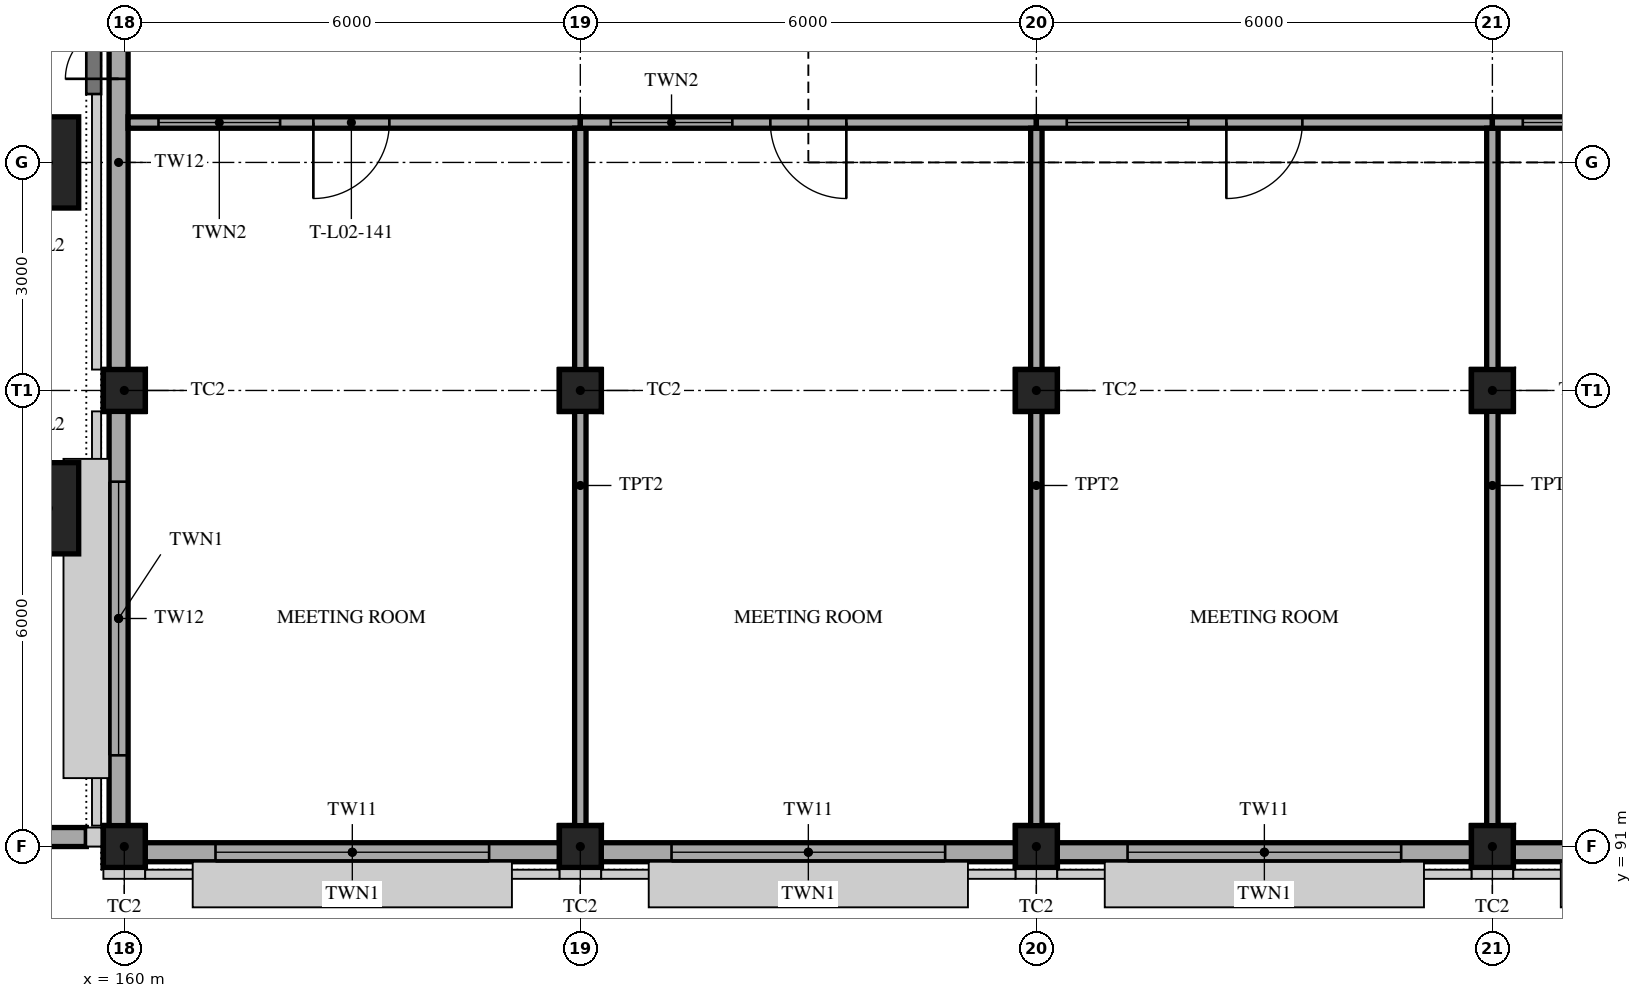
"""IFC4 building model, lengths in metres.
Left out: names, types, materials, properties, quantities, classifications, styles, units other than length and angle.
Written with IfcOpenShell. Run it as: python <this file> out.ifc"""

import sys

from ifc_helpers import new_model, si_unit, direction, frame, frame_2d, origin, origin_2d, place, context, subcontext, project, spatial, polyline, rectangle, hollow_rectangle, outline, extrude, element, fill, save


model = new_model("IFC4")
c1 = context("Model", 3, precision=1e-05, world=origin(), true_north=direction((0.0, 1.0)))
c2 = subcontext(c1, "Body", "Model", "MODEL_VIEW")
j1 = project(units=[si_unit("LENGTHUNIT", "METRE"), si_unit("PLANEANGLEUNIT", "RADIAN")], contexts=[c1])
p1 = place(None, origin())
s1 = spatial("IfcSite", under=j1, at=p1, CompositionType="ELEMENT")
p2 = place(p1, origin())
s2 = spatial("IfcBuilding", under=s1, at=p2, CompositionType="ELEMENT")
p3 = place(p2, frame((0.0, 0.0, 10.0)))
s3 = spatial("IfcBuildingStorey", under=s2, at=p3, CompositionType="ELEMENT", Elevation=10.0)
for number, where, z_axis, x_axis in (
    (1, (160.0, 91.0, 0.0), (0.0, 0.0, 1.0), (1.0, 0.0, 0.0)),
    (2, (160.0, 97.0, 0.0), (0.0, 0.0, 1.0), (1.0, 0.0, 0.0)),
    (3, (166.0, 91.0, 0.0), (0.0, 0.0, 1.0), (1.0, 0.0, 0.0)),
    (4, (172.0, 91.0, 0.0), (0.0, 0.0, 1.0), (1.0, 0.0, 0.0)),
    (5, (178.0, 91.0, 0.0), (0.0, 0.0, 1.0), (1.0, 0.0, 0.0)),
    (6, (166.0, 97.0, 0.0), (0.0, 0.0, 1.0), (1.0, 0.0, 0.0)),
    (7, (172.0, 97.0, 0.0), (0.0, 0.0, 1.0), (1.0, 0.0, 0.0)),
    (8, (178.0, 97.0, 0.0), (0.0, 0.0, 1.0), (1.0, 0.0, 0.0)),
):
    element("IfcColumn", number, at=place(p3, frame(where, z_axis=z_axis, x_axis=x_axis)), inside=s3, PredefinedType="COLUMN", context=c2, shape_type="SweptSolid", body=[
        extrude(hollow_rectangle(XDim=0.55, YDim=0.55, WallThickness=0.032, at=origin_2d()), origin(), (0.0, 0.0, 1.0), 5.0),
    ])
for number, where, z_axis, x_axis in (
    (9, (159.0, 95.45, 0.0), (0.0, 0.0, 1.0), (1.0, 0.0, 0.0)),
    (10, (159.0, 100.0, 0.0), (0.0, 0.0, 1.0), (1.0, 0.0, 0.0)),
):
    element("IfcColumn", number, at=place(p3, frame(where, z_axis=z_axis, x_axis=x_axis)), inside=s3, PredefinedType="COLUMN", context=c2, shape_type="SweptSolid", body=[
        extrude(rectangle(XDim=0.8, YDim=1.2, at=origin_2d()), origin(), (0.0, 0.0, 1.0), 5.0),
    ])
p4 = place(p3, frame((160.275, 90.925, 0.0), z_axis=(0.0, 0.0, 1.0), x_axis=(1.0, 0.0, 0.0)))
e11 = element("IfcWall", 11, at=p4, inside=s3, PredefinedType="SOLIDWALL", context=c2, shape_type="SweptSolid", body=[
    extrude(rectangle(XDim=5.45, YDim=0.25, at=frame_2d((2.725, 0.0))), origin(), (0.0, 0.0, 1.0), 4.35),
])
p5 = place(p4, frame((0.925, 0.0, 0.9)))
e12 = element("IfcOpeningElement", 12, at=p5, cuts=e11, PredefinedType="OPENING", context=c2, shape_type="SweptSolid", body=[
    extrude(rectangle(XDim=3.6, YDim=2.4, at=frame_2d((1.8, 1.2))), frame((0.0, 0.135, 0.0), z_axis=(0.0, -1.0, 0.0), x_axis=(1.0, 0.0, 0.0)), (0.0, 0.0, 1.0), 0.27),
])
p6 = place(p3, frame((166.275, 90.925, 0.0), z_axis=(0.0, 0.0, 1.0), x_axis=(1.0, 0.0, 0.0)))
e13 = element("IfcWall", 13, at=p6, inside=s3, PredefinedType="SOLIDWALL", context=c2, shape_type="SweptSolid", body=[
    extrude(rectangle(XDim=5.45, YDim=0.25, at=frame_2d((2.725, 0.0))), origin(), (0.0, 0.0, 1.0), 4.35),
])
p7 = place(p6, frame((0.925, 0.0, 0.9)))
e14 = element("IfcOpeningElement", 14, at=p7, cuts=e13, PredefinedType="OPENING", context=c2, shape_type="SweptSolid", body=[
    extrude(rectangle(XDim=3.6, YDim=2.4, at=frame_2d((1.8, 1.2))), frame((0.0, 0.135, 0.0), z_axis=(0.0, -1.0, 0.0), x_axis=(1.0, 0.0, 0.0)), (0.0, 0.0, 1.0), 0.27),
])
p8 = place(p3, frame((172.275, 90.925, 0.0), z_axis=(0.0, 0.0, 1.0), x_axis=(1.0, 0.0, 0.0)))
e15 = element("IfcWall", 15, at=p8, inside=s3, PredefinedType="SOLIDWALL", context=c2, shape_type="SweptSolid", body=[
    extrude(rectangle(XDim=5.45, YDim=0.25, at=frame_2d((2.725, 0.0))), origin(), (0.0, 0.0, 1.0), 4.35),
])
p9 = place(p8, frame((0.925, 0.0, 0.9)))
e16 = element("IfcOpeningElement", 16, at=p9, cuts=e15, PredefinedType="OPENING", context=c2, shape_type="SweptSolid", body=[
    extrude(rectangle(XDim=3.6, YDim=2.4, at=frame_2d((1.8, 1.2))), frame((0.0, 0.135, 0.0), z_axis=(0.0, -1.0, 0.0), x_axis=(1.0, 0.0, 0.0)), (0.0, 0.0, 1.0), 0.27),
])
p10 = place(p3, frame((178.275, 90.925, 0.0), z_axis=(0.0, 0.0, 1.0), x_axis=(1.0, 0.0, 0.0)))
e17 = element("IfcWall", 17, at=p10, inside=s3, PredefinedType="SOLIDWALL", context=c2, shape_type="SweptSolid", body=[
    extrude(rectangle(XDim=5.45, YDim=0.25, at=frame_2d((2.725, 0.0))), origin(), (0.0, 0.0, 1.0), 4.35),
])
p11 = place(p10, frame((0.925, 0.0, 0.9)))
e18 = element("IfcOpeningElement", 18, at=p11, cuts=e17, PredefinedType="OPENING", context=c2, shape_type="SweptSolid", body=[
    extrude(rectangle(XDim=3.6, YDim=2.4, at=frame_2d((1.8, 1.2))), frame((0.0, 0.135, 0.0), z_axis=(0.0, -1.0, 0.0), x_axis=(1.0, 0.0, 0.0)), (0.0, 0.0, 1.0), 0.27),
])
p12 = place(p3, frame((159.925, 91.275, 0.0), z_axis=(0.0, 0.0, 1.0), x_axis=(0.0, 1.0, 0.0)))
e19 = element("IfcWall", 19, at=p12, inside=s3, PredefinedType="SOLIDWALL", context=c2, shape_type="SweptSolid", body=[
    extrude(rectangle(XDim=5.45, YDim=0.25, at=frame_2d((2.725, 0.0))), origin(), (0.0, 0.0, 1.0), 4.35),
])
p13 = place(p12, frame((0.925, 0.0, 0.9)))
e20 = element("IfcOpeningElement", 20, at=p13, cuts=e19, PredefinedType="OPENING", context=c2, shape_type="SweptSolid", body=[
    extrude(rectangle(XDim=3.6, YDim=2.4, at=frame_2d((1.8, 1.2))), frame((0.0, 0.135, 0.0), z_axis=(0.0, -1.0, 0.0), x_axis=(1.0, 0.0, 0.0)), (0.0, 0.0, 1.0), 0.27),
])
p14 = place(p3, frame((159.925, 97.275, 0.0), z_axis=(0.0, 0.0, 1.0), x_axis=(0.0, 1.0, 0.0)))
e21 = element("IfcWall", 21, at=p14, inside=s3, PredefinedType="SOLIDWALL", context=c2, shape_type="SweptSolid", body=[
    extrude(rectangle(XDim=5.45, YDim=0.25, at=frame_2d((2.725, 0.0))), origin(), (0.0, 0.0, 1.0), 4.35),
])
p15 = place(p14, frame((3.825, 0.0, 0.0)))
e22 = element("IfcOpeningElement", 22, at=p15, cuts=e21, PredefinedType="OPENING", context=c2, shape_type="SweptSolid", body=[
    extrude(rectangle(XDim=1.4, YDim=2.1, at=frame_2d((0.7, 1.05))), frame((0.0, 0.135, 0.0), z_axis=(0.0, -1.0, 0.0), x_axis=(1.0, 0.0, 0.0)), (0.0, 0.0, 1.0), 0.27),
])
p16 = place(p3, frame((152.45, 91.125, 0.0), z_axis=(0.0, 0.0, 1.0), x_axis=(1.0, 0.0, 0.0)))
e23 = element("IfcWall", 23, at=p16, inside=s3, PredefinedType="SOLIDWALL", context=c2, shape_type="SweptSolid", body=[
    extrude(rectangle(XDim=7.05, YDim=0.25, at=frame_2d((3.525, 0.0))), origin(), (0.0, 0.0, 1.0), 4.59),
])
p17 = place(p3, frame((160.05, 100.525, 0.0), z_axis=(0.0, 0.0, 1.0), x_axis=(1.0, 0.0, 0.0)))
e24 = element("IfcWall", 24, at=p17, inside=s3, PredefinedType="PARTITIONING", context=c2, shape_type="SweptSolid", body=[
    extrude(rectangle(XDim=5.95, YDim=0.15, at=frame_2d((2.975, 0.0))), origin(), (0.0, 0.0, 1.0), 4.2),
])
p18 = place(p17, frame((0.4, 0.0, 0.9)))
e25 = element("IfcOpeningElement", 25, at=p18, cuts=e24, PredefinedType="OPENING", context=c2, shape_type="SweptSolid", body=[
    extrude(rectangle(XDim=1.6, YDim=1.2, at=frame_2d((0.8, 0.6))), frame((0.0, 0.085, 0.0), z_axis=(0.0, -1.0, 0.0), x_axis=(1.0, 0.0, 0.0)), (0.0, 0.0, 1.0), 0.17),
])
p19 = place(p17, frame((2.438, 0.0, 0.0)))
e26 = element("IfcOpeningElement", 26, at=p19, cuts=e24, PredefinedType="OPENING", context=c2, shape_type="SweptSolid", body=[
    extrude(rectangle(XDim=1.0, YDim=2.1, at=frame_2d((0.5, 1.05))), frame((0.0, 0.085, 0.0), z_axis=(0.0, -1.0, 0.0), x_axis=(1.0, 0.0, 0.0)), (0.0, 0.0, 1.0), 0.17),
])
p20 = place(p3, frame((166.0, 91.05, 0.0), z_axis=(0.0, 0.0, 1.0), x_axis=(0.0, 1.0, 0.0)))
e27 = element("IfcWall", 27, at=p20, inside=s3, PredefinedType="PARTITIONING", context=c2, shape_type="SweptSolid", body=[
    extrude(rectangle(XDim=9.4, YDim=0.15, at=frame_2d((4.7, 0.0))), origin(), (0.0, 0.0, 1.0), 4.2),
])
p21 = place(p3, frame((166.0, 100.525, 0.0), z_axis=(0.0, 0.0, 1.0), x_axis=(1.0, 0.0, 0.0)))
e28 = element("IfcWall", 28, at=p21, inside=s3, PredefinedType="PARTITIONING", context=c2, shape_type="SweptSolid", body=[
    extrude(rectangle(XDim=6.0, YDim=0.15, at=frame_2d((3.0, 0.0))), origin(), (0.0, 0.0, 1.0), 4.2),
])
p22 = place(p21, frame((0.4, 0.0, 0.9)))
e29 = element("IfcOpeningElement", 29, at=p22, cuts=e28, PredefinedType="OPENING", context=c2, shape_type="SweptSolid", body=[
    extrude(rectangle(XDim=1.6, YDim=1.2, at=frame_2d((0.8, 0.6))), frame((0.0, 0.085, 0.0), z_axis=(0.0, -1.0, 0.0), x_axis=(1.0, 0.0, 0.0)), (0.0, 0.0, 1.0), 0.17),
])
p23 = place(p21, frame((2.5, 0.0, 0.0)))
e30 = element("IfcOpeningElement", 30, at=p23, cuts=e28, PredefinedType="OPENING", context=c2, shape_type="SweptSolid", body=[
    extrude(rectangle(XDim=1.0, YDim=2.1, at=frame_2d((0.5, 1.05))), frame((0.0, 0.085, 0.0), z_axis=(0.0, -1.0, 0.0), x_axis=(1.0, 0.0, 0.0)), (0.0, 0.0, 1.0), 0.17),
])
p24 = place(p3, frame((172.0, 91.05, 0.0), z_axis=(0.0, 0.0, 1.0), x_axis=(0.0, 1.0, 0.0)))
e31 = element("IfcWall", 31, at=p24, inside=s3, PredefinedType="PARTITIONING", context=c2, shape_type="SweptSolid", body=[
    extrude(rectangle(XDim=9.4, YDim=0.15, at=frame_2d((4.7, 0.0))), origin(), (0.0, 0.0, 1.0), 4.2),
])
p25 = place(p3, frame((172.0, 100.525, 0.0), z_axis=(0.0, 0.0, 1.0), x_axis=(1.0, 0.0, 0.0)))
e32 = element("IfcWall", 32, at=p25, inside=s3, PredefinedType="PARTITIONING", context=c2, shape_type="SweptSolid", body=[
    extrude(rectangle(XDim=6.0, YDim=0.15, at=frame_2d((3.0, 0.0))), origin(), (0.0, 0.0, 1.0), 4.2),
])
p26 = place(p25, frame((0.4, 0.0, 0.9)))
e33 = element("IfcOpeningElement", 33, at=p26, cuts=e32, PredefinedType="OPENING", context=c2, shape_type="SweptSolid", body=[
    extrude(rectangle(XDim=1.6, YDim=1.2, at=frame_2d((0.8, 0.6))), frame((0.0, 0.085, 0.0), z_axis=(0.0, -1.0, 0.0), x_axis=(1.0, 0.0, 0.0)), (0.0, 0.0, 1.0), 0.17),
])
p27 = place(p25, frame((2.5, 0.0, 0.0)))
e34 = element("IfcOpeningElement", 34, at=p27, cuts=e32, PredefinedType="OPENING", context=c2, shape_type="SweptSolid", body=[
    extrude(rectangle(XDim=1.0, YDim=2.1, at=frame_2d((0.5, 1.05))), frame((0.0, 0.085, 0.0), z_axis=(0.0, -1.0, 0.0), x_axis=(1.0, 0.0, 0.0)), (0.0, 0.0, 1.0), 0.17),
])
p28 = place(p3, frame((178.0, 91.05, 0.0), z_axis=(0.0, 0.0, 1.0), x_axis=(0.0, 1.0, 0.0)))
e35 = element("IfcWall", 35, at=p28, inside=s3, PredefinedType="PARTITIONING", context=c2, shape_type="SweptSolid", body=[
    extrude(rectangle(XDim=9.4, YDim=0.15, at=frame_2d((4.7, 0.0))), origin(), (0.0, 0.0, 1.0), 4.2),
])
p29 = place(p3, frame((178.0, 100.525, 0.0), z_axis=(0.0, 0.0, 1.0), x_axis=(1.0, 0.0, 0.0)))
e36 = element("IfcWall", 36, at=p29, inside=s3, PredefinedType="PARTITIONING", context=c2, shape_type="SweptSolid", body=[
    extrude(rectangle(XDim=6.0, YDim=0.15, at=frame_2d((3.0, 0.0))), origin(), (0.0, 0.0, 1.0), 4.2),
])
p30 = place(p29, frame((0.4, 0.0, 0.9)))
e37 = element("IfcOpeningElement", 37, at=p30, cuts=e36, PredefinedType="OPENING", context=c2, shape_type="SweptSolid", body=[
    extrude(rectangle(XDim=1.6, YDim=1.2, at=frame_2d((0.8, 0.6))), frame((0.0, 0.085, 0.0), z_axis=(0.0, -1.0, 0.0), x_axis=(1.0, 0.0, 0.0)), (0.0, 0.0, 1.0), 0.17),
])
p31 = place(p29, frame((2.3, 0.0, 0.0)))
e38 = element("IfcOpeningElement", 38, at=p31, cuts=e36, PredefinedType="OPENING", context=c2, shape_type="SweptSolid", body=[
    extrude(rectangle(XDim=1.4, YDim=2.1, at=frame_2d((0.7, 1.05))), frame((0.0, 0.085, 0.0), z_axis=(0.0, -1.0, 0.0), x_axis=(1.0, 0.0, 0.0)), (0.0, 0.0, 1.0), 0.17),
])
p32 = place(p5, origin())
e39 = element("IfcWindow", 39, at=p32, inside=s3, PartitioningType="TRIPLE_PANEL_VERTICAL", PredefinedType="WINDOW", context=c2, shape_type="SweptSolid", body=[
    extrude(outline(polyline([(0.0, 0.0), (3.6, 0.0), (3.6, 2.4), (0.0, 2.4), (0.0, 0.0)]), holes=[polyline([(0.06, 0.06), (0.96, 0.06), (0.96, 2.34), (0.06, 2.34), (0.06, 0.06)]), polyline([(1.06, 0.06), (2.54, 0.06), (2.54, 2.34), (1.06, 2.34), (1.06, 0.06)]), polyline([(2.64, 0.06), (3.54, 0.06), (3.54, 2.34), (2.64, 2.34), (2.64, 0.06)])]), frame((0.0, 0.03, 0.0), z_axis=(0.0, -1.0, 0.0), x_axis=(1.0, 0.0, 0.0)), (0.0, 0.0, 1.0), 0.06),
    extrude(rectangle(XDim=0.924, YDim=2.304, at=frame_2d((0.51, 1.2))), frame((0.0, 0.01, 0.0), z_axis=(0.0, -1.0, 0.0), x_axis=(1.0, 0.0, 0.0)), (0.0, 0.0, 1.0), 0.02),
    extrude(rectangle(XDim=1.504, YDim=2.304, at=frame_2d((1.8, 1.2))), frame((0.0, 0.01, 0.0), z_axis=(0.0, -1.0, 0.0), x_axis=(1.0, 0.0, 0.0)), (0.0, 0.0, 1.0), 0.02),
    extrude(rectangle(XDim=0.924, YDim=2.304, at=frame_2d((3.09, 1.2))), frame((0.0, 0.01, 0.0), z_axis=(0.0, -1.0, 0.0), x_axis=(1.0, 0.0, 0.0)), (0.0, 0.0, 1.0), 0.02),
])
fill(e12, e39)
p33 = place(p7, origin())
e40 = element("IfcWindow", 40, at=p33, inside=s3, PartitioningType="TRIPLE_PANEL_VERTICAL", PredefinedType="WINDOW", context=c2, shape_type="SweptSolid", body=[
    extrude(outline(polyline([(0.0, 0.0), (3.6, 0.0), (3.6, 2.4), (0.0, 2.4), (0.0, 0.0)]), holes=[polyline([(0.06, 0.06), (0.96, 0.06), (0.96, 2.34), (0.06, 2.34), (0.06, 0.06)]), polyline([(1.06, 0.06), (2.54, 0.06), (2.54, 2.34), (1.06, 2.34), (1.06, 0.06)]), polyline([(2.64, 0.06), (3.54, 0.06), (3.54, 2.34), (2.64, 2.34), (2.64, 0.06)])]), frame((0.0, 0.03, 0.0), z_axis=(0.0, -1.0, 0.0), x_axis=(1.0, 0.0, 0.0)), (0.0, 0.0, 1.0), 0.06),
    extrude(rectangle(XDim=0.924, YDim=2.304, at=frame_2d((0.51, 1.2))), frame((0.0, 0.01, 0.0), z_axis=(0.0, -1.0, 0.0), x_axis=(1.0, 0.0, 0.0)), (0.0, 0.0, 1.0), 0.02),
    extrude(rectangle(XDim=1.504, YDim=2.304, at=frame_2d((1.8, 1.2))), frame((0.0, 0.01, 0.0), z_axis=(0.0, -1.0, 0.0), x_axis=(1.0, 0.0, 0.0)), (0.0, 0.0, 1.0), 0.02),
    extrude(rectangle(XDim=0.924, YDim=2.304, at=frame_2d((3.09, 1.2))), frame((0.0, 0.01, 0.0), z_axis=(0.0, -1.0, 0.0), x_axis=(1.0, 0.0, 0.0)), (0.0, 0.0, 1.0), 0.02),
])
fill(e14, e40)
p34 = place(p9, origin())
e41 = element("IfcWindow", 41, at=p34, inside=s3, PartitioningType="TRIPLE_PANEL_VERTICAL", PredefinedType="WINDOW", context=c2, shape_type="SweptSolid", body=[
    extrude(outline(polyline([(0.0, 0.0), (3.6, 0.0), (3.6, 2.4), (0.0, 2.4), (0.0, 0.0)]), holes=[polyline([(0.06, 0.06), (0.96, 0.06), (0.96, 2.34), (0.06, 2.34), (0.06, 0.06)]), polyline([(1.06, 0.06), (2.54, 0.06), (2.54, 2.34), (1.06, 2.34), (1.06, 0.06)]), polyline([(2.64, 0.06), (3.54, 0.06), (3.54, 2.34), (2.64, 2.34), (2.64, 0.06)])]), frame((0.0, 0.03, 0.0), z_axis=(0.0, -1.0, 0.0), x_axis=(1.0, 0.0, 0.0)), (0.0, 0.0, 1.0), 0.06),
    extrude(rectangle(XDim=0.924, YDim=2.304, at=frame_2d((0.51, 1.2))), frame((0.0, 0.01, 0.0), z_axis=(0.0, -1.0, 0.0), x_axis=(1.0, 0.0, 0.0)), (0.0, 0.0, 1.0), 0.02),
    extrude(rectangle(XDim=1.504, YDim=2.304, at=frame_2d((1.8, 1.2))), frame((0.0, 0.01, 0.0), z_axis=(0.0, -1.0, 0.0), x_axis=(1.0, 0.0, 0.0)), (0.0, 0.0, 1.0), 0.02),
    extrude(rectangle(XDim=0.924, YDim=2.304, at=frame_2d((3.09, 1.2))), frame((0.0, 0.01, 0.0), z_axis=(0.0, -1.0, 0.0), x_axis=(1.0, 0.0, 0.0)), (0.0, 0.0, 1.0), 0.02),
])
fill(e16, e41)
p35 = place(p13, origin())
e42 = element("IfcWindow", 42, at=p35, inside=s3, PartitioningType="TRIPLE_PANEL_VERTICAL", PredefinedType="WINDOW", context=c2, shape_type="SweptSolid", body=[
    extrude(outline(polyline([(0.0, 0.0), (3.6, 0.0), (3.6, 2.4), (0.0, 2.4), (0.0, 0.0)]), holes=[polyline([(0.06, 0.06), (0.96, 0.06), (0.96, 2.34), (0.06, 2.34), (0.06, 0.06)]), polyline([(1.06, 0.06), (2.54, 0.06), (2.54, 2.34), (1.06, 2.34), (1.06, 0.06)]), polyline([(2.64, 0.06), (3.54, 0.06), (3.54, 2.34), (2.64, 2.34), (2.64, 0.06)])]), frame((0.0, 0.03, 0.0), z_axis=(0.0, -1.0, 0.0), x_axis=(1.0, 0.0, 0.0)), (0.0, 0.0, 1.0), 0.06),
    extrude(rectangle(XDim=0.924, YDim=2.304, at=frame_2d((0.51, 1.2))), frame((0.0, 0.01, 0.0), z_axis=(0.0, -1.0, 0.0), x_axis=(1.0, 0.0, 0.0)), (0.0, 0.0, 1.0), 0.02),
    extrude(rectangle(XDim=1.504, YDim=2.304, at=frame_2d((1.8, 1.2))), frame((0.0, 0.01, 0.0), z_axis=(0.0, -1.0, 0.0), x_axis=(1.0, 0.0, 0.0)), (0.0, 0.0, 1.0), 0.02),
    extrude(rectangle(XDim=0.924, YDim=2.304, at=frame_2d((3.09, 1.2))), frame((0.0, 0.01, 0.0), z_axis=(0.0, -1.0, 0.0), x_axis=(1.0, 0.0, 0.0)), (0.0, 0.0, 1.0), 0.02),
])
fill(e20, e42)
p36 = place(p15, origin())
e43 = element("IfcDoor", 43, at=p36, inside=s3, OperationType="DOUBLE_DOOR_SINGLE_SWING", PredefinedType="DOOR", context=c2, shape_type="SweptSolid", body=[
    extrude(rectangle(XDim=1.4, YDim=2.1, at=frame_2d((0.7, 1.05))), frame((0.0, 0.025, 0.0), z_axis=(0.0, -1.0, 0.0), x_axis=(1.0, 0.0, 0.0)), (0.0, 0.0, 1.0), 0.05),
])
fill(e22, e43)
p37 = place(p18, origin())
e44 = element("IfcWindow", 44, at=p37, inside=s3, PartitioningType="SINGLE_PANEL", PredefinedType="WINDOW", context=c2, shape_type="SweptSolid", body=[
    extrude(rectangle(XDim=1.6, YDim=1.2, at=frame_2d((0.8, 0.6))), frame((0.0, 0.03, 0.0), z_axis=(0.0, -1.0, 0.0), x_axis=(1.0, 0.0, 0.0)), (0.0, 0.0, 1.0), 0.06),
])
fill(e25, e44)
p38 = place(p22, origin())
e45 = element("IfcWindow", 45, at=p38, inside=s3, PartitioningType="SINGLE_PANEL", PredefinedType="WINDOW", context=c2, shape_type="SweptSolid", body=[
    extrude(rectangle(XDim=1.6, YDim=1.2, at=frame_2d((0.8, 0.6))), frame((0.0, 0.03, 0.0), z_axis=(0.0, -1.0, 0.0), x_axis=(1.0, 0.0, 0.0)), (0.0, 0.0, 1.0), 0.06),
])
fill(e29, e45)
p39 = place(p26, origin())
e46 = element("IfcWindow", 46, at=p39, inside=s3, PartitioningType="SINGLE_PANEL", PredefinedType="WINDOW", context=c2, shape_type="SweptSolid", body=[
    extrude(rectangle(XDim=1.6, YDim=1.2, at=frame_2d((0.8, 0.6))), frame((0.0, 0.03, 0.0), z_axis=(0.0, -1.0, 0.0), x_axis=(1.0, 0.0, 0.0)), (0.0, 0.0, 1.0), 0.06),
])
fill(e33, e46)
p40 = place(p30, origin())
e47 = element("IfcWindow", 47, at=p40, inside=s3, PartitioningType="SINGLE_PANEL", PredefinedType="WINDOW", context=c2, shape_type="SweptSolid", body=[
    extrude(rectangle(XDim=1.6, YDim=1.2, at=frame_2d((0.8, 0.6))), frame((0.0, 0.03, 0.0), z_axis=(0.0, -1.0, 0.0), x_axis=(1.0, 0.0, 0.0)), (0.0, 0.0, 1.0), 0.06),
])
fill(e37, e47)
p41 = place(p19, frame((1.0, 0.0, 0.0), z_axis=(0.0, 0.0, 1.0), x_axis=(-1.0, 0.0, 0.0)))
e48 = element("IfcDoor", 48, at=p41, inside=s3, OperationType="SINGLE_SWING_RIGHT", PredefinedType="DOOR", context=c2, shape_type="SweptSolid", body=[
    extrude(rectangle(XDim=1.0, YDim=2.1, at=frame_2d((0.5, 1.05))), frame((0.0, 0.025, 0.0), z_axis=(0.0, -1.0, 0.0), x_axis=(1.0, 0.0, 0.0)), (0.0, 0.0, 1.0), 0.05),
])
fill(e26, e48)
p42 = place(p23, frame((1.0, 0.0, 0.0), z_axis=(0.0, 0.0, 1.0), x_axis=(-1.0, 0.0, 0.0)))
e49 = element("IfcDoor", 49, at=p42, inside=s3, OperationType="SINGLE_SWING_LEFT", PredefinedType="DOOR", context=c2, shape_type="SweptSolid", body=[
    extrude(rectangle(XDim=1.0, YDim=2.1, at=frame_2d((0.5, 1.05))), frame((0.0, 0.025, 0.0), z_axis=(0.0, -1.0, 0.0), x_axis=(1.0, 0.0, 0.0)), (0.0, 0.0, 1.0), 0.05),
])
fill(e30, e49)
p43 = place(p27, frame((1.0, 0.0, 0.0), z_axis=(0.0, 0.0, 1.0), x_axis=(-1.0, 0.0, 0.0)))
e50 = element("IfcDoor", 50, at=p43, inside=s3, OperationType="SINGLE_SWING_RIGHT", PredefinedType="DOOR", context=c2, shape_type="SweptSolid", body=[
    extrude(rectangle(XDim=1.0, YDim=2.1, at=frame_2d((0.5, 1.05))), frame((0.0, 0.025, 0.0), z_axis=(0.0, -1.0, 0.0), x_axis=(1.0, 0.0, 0.0)), (0.0, 0.0, 1.0), 0.05),
])
fill(e34, e50)
save(model, sys.argv[1])
